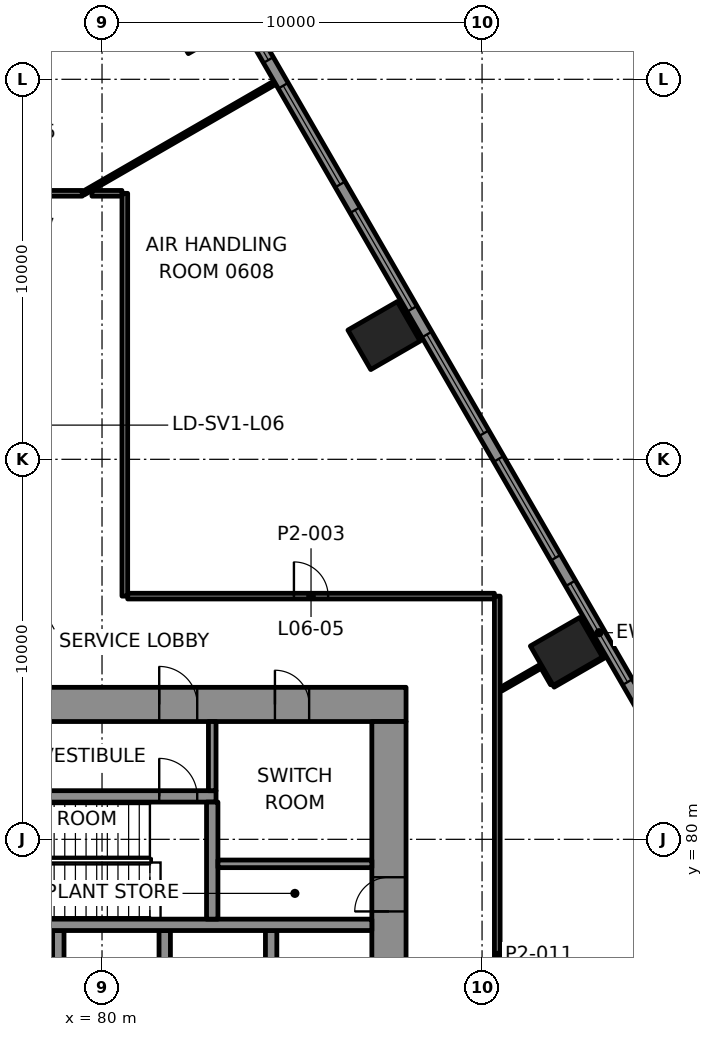
"""IFC4 building model, lengths in metres.
Left out: names, types, materials, properties, quantities, classifications, styles, units other than length and angle.
Written with IfcOpenShell. Run it as: python <this file> out.ifc"""

import sys

from ifc_helpers import new_model, si_unit, direction, frame, frame_2d, origin, origin_2d, place, context, subcontext, project, spatial, rectangle, extrude, element, fill, save


model = new_model("IFC4")
c1 = context("Model", 3, precision=1e-05, world=origin(), true_north=direction((0.0, 1.0)))
c2 = subcontext(c1, "Body", "Model", "MODEL_VIEW")
j1 = project(units=[si_unit("LENGTHUNIT", "METRE"), si_unit("PLANEANGLEUNIT", "RADIAN")], contexts=[c1])
p1 = place(None, origin())
s1 = spatial("IfcSite", under=j1, at=p1, CompositionType="ELEMENT")
p2 = place(p1, origin())
s2 = spatial("IfcBuilding", under=s1, at=p2, CompositionType="ELEMENT")
p3 = place(p2, frame((0.0, 0.0, 31.0)))
s3 = spatial("IfcBuildingStorey", under=s2, at=p3, CompositionType="ELEMENT", Elevation=31.0)
for number, where, z_axis, x_axis in (
    (1, (92.22, 84.942, -0.0), (0.0, 0.0, 1.0), (-0.5, 0.866, 0.0)),
    (2, (87.421, 93.256, -0.0), (0.0, 0.0, 1.0), (-0.5, 0.866, 0.0)),
    (3, (82.621, 101.57, -0.0), (0.0, 0.0, 1.0), (-0.5, 0.866, 0.0)),
):
    element("IfcColumn", number, at=place(p3, frame(where, z_axis=z_axis, x_axis=x_axis)), inside=s3, PredefinedType="COLUMN", context=c2, shape_type="SweptSolid", body=[
        extrude(rectangle(XDim=1.2, YDim=1.5, at=origin_2d()), origin(), (0.0, 0.0, 1.0), 4.5),
    ])
p4 = place(p3, frame((62.0, 83.55, 0.0), z_axis=(0.0, 0.0, 1.0), x_axis=(1.0, 0.0, 0.0)))
e4 = element("IfcWall", 4, at=p4, inside=s3, PredefinedType="SHEAR", context=c2, shape_type="SweptSolid", body=[
    extrude(rectangle(XDim=26.0, YDim=0.9, at=frame_2d((13.0, 0.0))), origin(), (0.0, 0.0, 1.0), 4.05),
])
p5 = place(p4, frame((5.695, 0.0, 0.0)))
e5 = element("IfcOpeningElement", 5, at=p5, cuts=e4, PredefinedType="OPENING", context=c2, shape_type="SweptSolid", body=[
    extrude(rectangle(XDim=1.0, YDim=2.1, at=frame_2d((0.5, 1.05))), frame((0.0, 0.46, 0.0), z_axis=(0.0, -1.0, 0.0), x_axis=(1.0, 0.0, 0.0)), (0.0, 0.0, 1.0), 0.92),
])
p6 = place(p4, frame((19.505, 0.0, 0.0)))
e6 = element("IfcOpeningElement", 6, at=p6, cuts=e4, PredefinedType="OPENING", context=c2, shape_type="SweptSolid", body=[
    extrude(rectangle(XDim=1.0, YDim=2.1, at=frame_2d((0.5, 1.05))), frame((0.0, 0.46, 0.0), z_axis=(0.0, -1.0, 0.0), x_axis=(1.0, 0.0, 0.0)), (0.0, 0.0, 1.0), 0.92),
])
p7 = place(p4, frame((3.45, 0.0, 0.0)))
e7 = element("IfcOpeningElement", 7, at=p7, cuts=e4, PredefinedType="OPENING", context=c2, shape_type="SweptSolid", body=[
    extrude(rectangle(XDim=0.9, YDim=2.1, at=frame_2d((0.45, 1.05))), frame((0.0, 0.46, 0.0), z_axis=(0.0, -1.0, 0.0), x_axis=(1.0, 0.0, 0.0)), (0.0, 0.0, 1.0), 0.92),
])
p8 = place(p4, frame((12.65, 0.0, 0.0)))
e8 = element("IfcOpeningElement", 8, at=p8, cuts=e4, PredefinedType="OPENING", context=c2, shape_type="SweptSolid", body=[
    extrude(rectangle(XDim=0.9, YDim=2.1, at=frame_2d((0.45, 1.05))), frame((0.0, 0.46, 0.0), z_axis=(0.0, -1.0, 0.0), x_axis=(1.0, 0.0, 0.0)), (0.0, 0.0, 1.0), 0.92),
])
p9 = place(p4, frame((22.55, 0.0, 0.0)))
e9 = element("IfcOpeningElement", 9, at=p9, cuts=e4, PredefinedType="OPENING", context=c2, shape_type="SweptSolid", body=[
    extrude(rectangle(XDim=0.9, YDim=2.1, at=frame_2d((0.45, 1.05))), frame((0.0, 0.46, 0.0), z_axis=(0.0, -1.0, 0.0), x_axis=(1.0, 0.0, 0.0)), (0.0, 0.0, 1.0), 0.92),
])
p10 = place(p3, frame((87.55, 66.9, 0.0), z_axis=(0.0, 0.0, 1.0), x_axis=(0.0, 1.0, 0.0)))
e10 = element("IfcWall", 10, at=p10, inside=s3, PredefinedType="SHEAR", context=c2, shape_type="SweptSolid", body=[
    extrude(rectangle(XDim=16.2, YDim=0.9, at=frame_2d((8.1, 0.0))), origin(), (0.0, 0.0, 1.0), 4.05),
])
p11 = place(p10, frame((5.5, 0.0, 0.0)))
e11 = element("IfcOpeningElement", 11, at=p11, cuts=e10, PredefinedType="OPENING", context=c2, shape_type="SweptSolid", body=[
    extrude(rectangle(XDim=1.8, YDim=2.1, at=frame_2d((0.9, 1.05))), frame((0.0, 0.46, 0.0), z_axis=(0.0, -1.0, 0.0), x_axis=(1.0, 0.0, 0.0)), (0.0, 0.0, 1.0), 0.92),
])
p12 = place(p10, frame((11.202, 0.0, 0.0)))
e12 = element("IfcOpeningElement", 12, at=p12, cuts=e10, PredefinedType="OPENING", context=c2, shape_type="SweptSolid", body=[
    extrude(rectangle(XDim=0.9, YDim=2.1, at=frame_2d((0.45, 1.05))), frame((0.0, 0.46, 0.0), z_axis=(0.0, -1.0, 0.0), x_axis=(1.0, 0.0, 0.0)), (0.0, 0.0, 1.0), 0.92),
])
for number, where, z_axis, x_axis in (
    (13, (78.85, 75.0, 0.0), (0.0, 0.0, 1.0), (0.0, 1.0, 0.0)),
    (14, (81.65, 75.0, 0.0), (0.0, 0.0, 1.0), (0.0, 1.0, 0.0)),
    (15, (84.45, 75.0, 0.0), (0.0, 0.0, 1.0), (0.0, 1.0, 0.0)),
):
    element("IfcWall", number, at=place(p3, frame(where, z_axis=z_axis, x_axis=x_axis)), inside=s3, PredefinedType="SHEAR", context=c2, shape_type="SweptSolid", body=[
        extrude(rectangle(XDim=2.6, YDim=0.3, at=frame_2d((1.3, 0.0))), origin(), (0.0, 0.0, 1.0), 4.05),
    ])
p13 = place(p3, frame((64.35, 77.75, 0.0), z_axis=(0.0, 0.0, 1.0), x_axis=(1.0, 0.0, 0.0)))
e16 = element("IfcWall", 16, at=p13, inside=s3, PredefinedType="SHEAR", context=c2, shape_type="SweptSolid", body=[
    extrude(rectangle(XDim=22.75, YDim=0.3, at=frame_2d((11.375, 0.0))), origin(), (0.0, 0.0, 1.0), 4.05),
])
p14 = place(p13, frame((3.345, 0.0, 0.0)))
e17 = element("IfcOpeningElement", 17, at=p14, cuts=e16, PredefinedType="OPENING", context=c2, shape_type="SweptSolid", body=[
    extrude(rectangle(XDim=1.0, YDim=2.1, at=frame_2d((0.5, 1.05))), frame((0.0, 0.16, 0.0), z_axis=(0.0, -1.0, 0.0), x_axis=(1.0, 0.0, 0.0)), (0.0, 0.0, 1.0), 0.32),
])
p15 = place(p3, frame((76.14, 81.13, 0.0), z_axis=(0.0, 0.0, 1.0), x_axis=(1.0, 0.0, 0.0)))
e18 = element("IfcWall", 18, at=p15, inside=s3, PredefinedType="SHEAR", context=c2, shape_type="SweptSolid", body=[
    extrude(rectangle(XDim=6.86, YDim=0.3, at=frame_2d((3.43, 0.0))), origin(), (0.0, 0.0, 1.0), 4.05),
])
p16 = place(p15, frame((5.365, 0.0, 0.0)))
e19 = element("IfcOpeningElement", 19, at=p16, cuts=e18, PredefinedType="OPENING", context=c2, shape_type="SweptSolid", body=[
    extrude(rectangle(XDim=1.0, YDim=2.1, at=frame_2d((0.5, 1.05))), frame((0.0, 0.16, 0.0), z_axis=(0.0, -1.0, 0.0), x_axis=(1.0, 0.0, 0.0)), (0.0, 0.0, 1.0), 0.32),
])
p17 = place(p3, frame((82.9, 77.9, 0.0), z_axis=(0.0, 0.0, 1.0), x_axis=(0.0, 1.0, 0.0)))
e20 = element("IfcWall", 20, at=p17, inside=s3, PredefinedType="SHEAR", context=c2, shape_type="SweptSolid", body=[
    extrude(rectangle(XDim=3.08, YDim=0.3, at=frame_2d((1.54, 0.0))), origin(), (0.0, 0.0, 1.0), 4.05),
])
p18 = place(p3, frame((80.675, 86.4, 0.0), z_axis=(0.0, 0.0, 1.0), x_axis=(1.0, 0.0, 0.0)))
e21 = element("IfcWall", 21, at=p18, inside=s3, PredefinedType="PARTITIONING", context=c2, shape_type="SweptSolid", body=[
    extrude(rectangle(XDim=9.649, YDim=0.15, at=frame_2d((4.825, 0.0))), origin(), (0.0, 0.0, 1.0), 3.45),
])
p19 = place(p18, frame((4.375, 0.0, 0.0)))
e22 = element("IfcOpeningElement", 22, at=p19, cuts=e21, PredefinedType="OPENING", context=c2, shape_type="SweptSolid", body=[
    extrude(rectangle(XDim=0.9, YDim=2.1, at=frame_2d((0.45, 1.05))), frame((0.0, 0.085, 0.0), z_axis=(0.0, -1.0, 0.0), x_axis=(1.0, 0.0, 0.0)), (0.0, 0.0, 1.0), 0.17),
])
p20 = place(p3, frame((76.275, 97.0, 0.0), z_axis=(0.0, 0.0, 1.0), x_axis=(1.0, 0.0, 0.0)))
e23 = element("IfcWall", 23, at=p20, inside=s3, PredefinedType="PARTITIONING", context=c2, shape_type="SweptSolid", body=[
    extrude(rectangle(XDim=3.205, YDim=0.15, at=frame_2d((1.603, 0.0))), origin(), (0.0, 0.0, 1.0), 3.45),
])
p21 = place(p20, frame((1.153, 0.0, 0.0)))
e24 = element("IfcOpeningElement", 24, at=p21, cuts=e23, PredefinedType="OPENING", context=c2, shape_type="SweptSolid", body=[
    extrude(rectangle(XDim=0.9, YDim=2.1, at=frame_2d((0.45, 1.05))), frame((0.0, 0.085, 0.0), z_axis=(0.0, -1.0, 0.0), x_axis=(1.0, 0.0, 0.0)), (0.0, 0.0, 1.0), 0.17),
])
p22 = place(p3, frame((91.871, 84.048, 0.0), z_axis=(0.0, 0.0, 1.0), x_axis=(0.866026058841, 0.499998865407, 0.0)))
e25 = element("IfcWall", 25, at=p22, inside=s3, PredefinedType="PARTITIONING", context=c2, shape_type="SweptSolid", body=[
    extrude(rectangle(XDim=1.708, YDim=0.1, at=frame_2d((0.854, 0.0))), origin(), (0.0, 0.0, 1.0), 3.215),
])
p23 = place(p3, frame((90.501, 83.95, 0.0), z_axis=(0.0, 0.0, 1.0), x_axis=(0.866057204957, 0.499944914708, 0.0)))
e26 = element("IfcWall", 26, at=p23, inside=s3, PredefinedType="PARTITIONING", context=c2, shape_type="SweptSolid", body=[
    extrude(rectangle(XDim=1.235, YDim=0.1, at=frame_2d((0.618, 0.0))), origin(), (0.0, 0.0, 1.0), 3.45),
])
p24 = place(p3, frame((79.505, 97.0, 0.0), z_axis=(0.0, 0.0, 1.0), x_axis=(0.866009767966, 0.500027081053, 0.0)))
e27 = element("IfcWall", 27, at=p24, inside=s3, PredefinedType="PARTITIONING", context=c2, shape_type="SweptSolid", body=[
    extrude(rectangle(XDim=5.943, YDim=0.1, at=frame_2d((2.972, 0.0))), origin(), (0.0, 0.0, 1.0), 3.215),
])
p25 = place(p3, frame((90.4, 86.399, 0.0), z_axis=(0.0, 0.0, 1.0), x_axis=(0.0, -1.0, 0.0)))
e28 = element("IfcWall", 28, at=p25, inside=s3, PredefinedType="PARTITIONING", context=c2, shape_type="SweptSolid", body=[
    extrude(rectangle(XDim=18.905, YDim=0.15, at=frame_2d((9.453, 0.0))), origin(), (0.0, 0.0, 1.0), 3.45),
])
p26 = place(p25, frame((10.005, 0.0, 0.0)))
e29 = element("IfcOpeningElement", 29, at=p26, cuts=e28, PredefinedType="OPENING", context=c2, shape_type="SweptSolid", body=[
    extrude(rectangle(XDim=1.2, YDim=2.1, at=frame_2d((0.6, 1.05))), frame((0.0, 0.085, 0.0), z_axis=(0.0, -1.0, 0.0), x_axis=(1.0, 0.0, 0.0)), (0.0, 0.0, 1.0), 0.17),
])
p27 = place(p3, frame((80.6, 86.4, 0.0), z_axis=(0.0, 0.0, 1.0), x_axis=(0.0, 1.0, 0.0)))
e30 = element("IfcWall", 30, at=p27, inside=s3, PredefinedType="PARTITIONING", context=c2, shape_type="SweptSolid", body=[
    extrude(rectangle(XDim=10.6, YDim=0.15, at=frame_2d((5.3, 0.0))), origin(), (0.0, 0.0, 1.0), 3.45),
])
p28 = place(p3, frame((91.846, 84.092, 0.0), z_axis=(0.0, 0.0, 1.0), x_axis=(-0.500244977835, 0.865883919559, 0.0)))
e31 = element("IfcWall", 31, at=p28, inside=s3, PredefinedType="PARTITIONING", context=c2, shape_type="SweptSolid", body=[
    extrude(rectangle(XDim=0.499, YDim=0.1, at=frame_2d((0.25, 0.0))), origin(), (0.0, 0.0, 1.0), 3.45),
])
p29 = place(p3, frame((79.735, 97.0, 0.0), z_axis=(0.0, 0.0, 1.0), x_axis=(1.0, 0.0, 0.0)))
e32 = element("IfcWall", 32, at=p29, inside=s3, PredefinedType="PARTITIONING", context=c2, shape_type="SweptSolid", body=[
    extrude(rectangle(XDim=0.79, YDim=0.15, at=frame_2d((0.395, 0.0))), origin(), (0.0, 0.0, 1.0), 3.45),
])
p30 = place(p3, frame((107.504, 60.451, 0.0), z_axis=(0.0, 0.0, 1.0), x_axis=(-0.500000550228, 0.86602508611, 0.0)))
e33 = element("IfcWall", 33, at=p30, inside=s3, PredefinedType="SOLIDWALL", context=c2, shape_type="SweptSolid", body=[
    extrude(rectangle(XDim=57.704, YDim=0.3, at=frame_2d((28.852, 0.0))), origin(), (0.0, 0.0, 1.0), 4.05),
])
p31 = place(p30, frame((0.89, 0.0, 0.8)))
e34 = element("IfcOpeningElement", 34, at=p31, cuts=e33, PredefinedType="OPENING", context=c2, shape_type="SweptSolid", body=[
    extrude(rectangle(XDim=3.0, YDim=2.4, at=frame_2d((1.5, 1.2))), frame((0.0, 0.16, 0.0), z_axis=(0.0, -1.0, 0.0), x_axis=(1.0, 0.0, 0.0)), (0.0, 0.0, 1.0), 0.32),
])
p32 = place(p30, frame((4.67, 0.0, 0.8)))
e35 = element("IfcOpeningElement", 35, at=p32, cuts=e33, PredefinedType="OPENING", context=c2, shape_type="SweptSolid", body=[
    extrude(rectangle(XDim=3.0, YDim=2.4, at=frame_2d((1.5, 1.2))), frame((0.0, 0.16, 0.0), z_axis=(0.0, -1.0, 0.0), x_axis=(1.0, 0.0, 0.0)), (0.0, 0.0, 1.0), 0.32),
])
p33 = place(p30, frame((8.451, 0.0, 0.8)))
e36 = element("IfcOpeningElement", 36, at=p33, cuts=e33, PredefinedType="OPENING", context=c2, shape_type="SweptSolid", body=[
    extrude(rectangle(XDim=3.0, YDim=2.4, at=frame_2d((1.5, 1.2))), frame((0.0, 0.16, 0.0), z_axis=(0.0, -1.0, 0.0), x_axis=(1.0, 0.0, 0.0)), (0.0, 0.0, 1.0), 0.32),
])
p34 = place(p30, frame((12.231, 0.0, 0.8)))
e37 = element("IfcOpeningElement", 37, at=p34, cuts=e33, PredefinedType="OPENING", context=c2, shape_type="SweptSolid", body=[
    extrude(rectangle(XDim=3.0, YDim=2.4, at=frame_2d((1.5, 1.2))), frame((0.0, 0.16, 0.0), z_axis=(0.0, -1.0, 0.0), x_axis=(1.0, 0.0, 0.0)), (0.0, 0.0, 1.0), 0.32),
])
p35 = place(p30, frame((16.011, 0.0, 0.8)))
e38 = element("IfcOpeningElement", 38, at=p35, cuts=e33, PredefinedType="OPENING", context=c2, shape_type="SweptSolid", body=[
    extrude(rectangle(XDim=3.0, YDim=2.4, at=frame_2d((1.5, 1.2))), frame((0.0, 0.16, 0.0), z_axis=(0.0, -1.0, 0.0), x_axis=(1.0, 0.0, 0.0)), (0.0, 0.0, 1.0), 0.32),
])
p36 = place(p30, frame((19.792, 0.0, 0.8)))
e39 = element("IfcOpeningElement", 39, at=p36, cuts=e33, PredefinedType="OPENING", context=c2, shape_type="SweptSolid", body=[
    extrude(rectangle(XDim=3.0, YDim=2.4, at=frame_2d((1.5, 1.2))), frame((0.0, 0.16, 0.0), z_axis=(0.0, -1.0, 0.0), x_axis=(1.0, 0.0, 0.0)), (0.0, 0.0, 1.0), 0.32),
])
p37 = place(p30, frame((23.572, 0.0, 0.8)))
e40 = element("IfcOpeningElement", 40, at=p37, cuts=e33, PredefinedType="OPENING", context=c2, shape_type="SweptSolid", body=[
    extrude(rectangle(XDim=3.0, YDim=2.4, at=frame_2d((1.5, 1.2))), frame((0.0, 0.16, 0.0), z_axis=(0.0, -1.0, 0.0), x_axis=(1.0, 0.0, 0.0)), (0.0, 0.0, 1.0), 0.32),
])
p38 = place(p30, frame((27.352, 0.0, 0.8)))
e41 = element("IfcOpeningElement", 41, at=p38, cuts=e33, PredefinedType="OPENING", context=c2, shape_type="SweptSolid", body=[
    extrude(rectangle(XDim=3.0, YDim=2.4, at=frame_2d((1.5, 1.2))), frame((0.0, 0.16, 0.0), z_axis=(0.0, -1.0, 0.0), x_axis=(1.0, 0.0, 0.0)), (0.0, 0.0, 1.0), 0.32),
])
p39 = place(p30, frame((31.132, 0.0, 0.8)))
e42 = element("IfcOpeningElement", 42, at=p39, cuts=e33, PredefinedType="OPENING", context=c2, shape_type="SweptSolid", body=[
    extrude(rectangle(XDim=3.0, YDim=2.4, at=frame_2d((1.5, 1.2))), frame((0.0, 0.16, 0.0), z_axis=(0.0, -1.0, 0.0), x_axis=(1.0, 0.0, 0.0)), (0.0, 0.0, 1.0), 0.32),
])
p40 = place(p30, frame((34.913, 0.0, 0.8)))
e43 = element("IfcOpeningElement", 43, at=p40, cuts=e33, PredefinedType="OPENING", context=c2, shape_type="SweptSolid", body=[
    extrude(rectangle(XDim=3.0, YDim=2.4, at=frame_2d((1.5, 1.2))), frame((0.0, 0.16, 0.0), z_axis=(0.0, -1.0, 0.0), x_axis=(1.0, 0.0, 0.0)), (0.0, 0.0, 1.0), 0.32),
])
p41 = place(p30, frame((38.693, 0.0, 0.8)))
e44 = element("IfcOpeningElement", 44, at=p41, cuts=e33, PredefinedType="OPENING", context=c2, shape_type="SweptSolid", body=[
    extrude(rectangle(XDim=3.0, YDim=2.4, at=frame_2d((1.5, 1.2))), frame((0.0, 0.16, 0.0), z_axis=(0.0, -1.0, 0.0), x_axis=(1.0, 0.0, 0.0)), (0.0, 0.0, 1.0), 0.32),
])
p42 = place(p30, frame((42.473, 0.0, 0.8)))
e45 = element("IfcOpeningElement", 45, at=p42, cuts=e33, PredefinedType="OPENING", context=c2, shape_type="SweptSolid", body=[
    extrude(rectangle(XDim=3.0, YDim=2.4, at=frame_2d((1.5, 1.2))), frame((0.0, 0.16, 0.0), z_axis=(0.0, -1.0, 0.0), x_axis=(1.0, 0.0, 0.0)), (0.0, 0.0, 1.0), 0.32),
])
p43 = place(p30, frame((46.253, 0.0, 0.8)))
e46 = element("IfcOpeningElement", 46, at=p43, cuts=e33, PredefinedType="OPENING", context=c2, shape_type="SweptSolid", body=[
    extrude(rectangle(XDim=3.0, YDim=2.4, at=frame_2d((1.5, 1.2))), frame((0.0, 0.16, 0.0), z_axis=(0.0, -1.0, 0.0), x_axis=(1.0, 0.0, 0.0)), (0.0, 0.0, 1.0), 0.32),
])
p44 = place(p30, frame((50.033, 0.0, 0.8)))
e47 = element("IfcOpeningElement", 47, at=p44, cuts=e33, PredefinedType="OPENING", context=c2, shape_type="SweptSolid", body=[
    extrude(rectangle(XDim=3.0, YDim=2.4, at=frame_2d((1.5, 1.2))), frame((0.0, 0.16, 0.0), z_axis=(0.0, -1.0, 0.0), x_axis=(1.0, 0.0, 0.0)), (0.0, 0.0, 1.0), 0.32),
])
p45 = place(p30, frame((53.814, 0.0, 0.8)))
e48 = element("IfcOpeningElement", 48, at=p45, cuts=e33, PredefinedType="OPENING", context=c2, shape_type="SweptSolid", body=[
    extrude(rectangle(XDim=3.0, YDim=2.4, at=frame_2d((1.5, 1.2))), frame((0.0, 0.16, 0.0), z_axis=(0.0, -1.0, 0.0), x_axis=(1.0, 0.0, 0.0)), (0.0, 0.0, 1.0), 0.32),
])
p46 = place(p3, frame((83.05, 79.355, 0.0), z_axis=(0.0, 0.0, 1.0), x_axis=(1.0, 0.0, 0.0)))
e49 = element("IfcWall", 49, at=p46, inside=s3, PredefinedType="PARTITIONING", context=c2, shape_type="SweptSolid", body=[
    extrude(rectangle(XDim=4.05, YDim=0.2, at=frame_2d((2.025, 0.0))), origin(), (0.0, 0.0, 1.0), 4.05),
])
p47 = place(p3, frame((82.9, 81.28, 0.0), z_axis=(0.0, 0.0, 1.0), x_axis=(0.0, 1.0, 0.0)))
e50 = element("IfcWall", 50, at=p47, inside=s3, PredefinedType="PARTITIONING", context=c2, shape_type="SweptSolid", body=[
    extrude(rectangle(XDim=1.82, YDim=0.2, at=frame_2d((0.91, 0.0))), origin(), (0.0, 0.0, 1.0), 4.05),
])
p48 = place(p19, origin())
e51 = element("IfcDoor", 51, at=p48, inside=s3, OperationType="SINGLE_SWING_LEFT", PredefinedType="DOOR", context=c2, shape_type="SweptSolid", body=[
    extrude(rectangle(XDim=0.9, YDim=2.1, at=frame_2d((0.45, 1.05))), frame((0.0, 0.025, 0.0), z_axis=(0.0, -1.0, 0.0), x_axis=(1.0, 0.0, 0.0)), (0.0, 0.0, 1.0), 0.05),
])
fill(e22, e51)
p49 = place(p38, origin())
e52 = element("IfcWindow", 52, at=p49, inside=s3, PartitioningType="SINGLE_PANEL", PredefinedType="WINDOW", context=c2, shape_type="SweptSolid", body=[
    extrude(rectangle(XDim=3.0, YDim=2.4, at=frame_2d((1.5, 1.2))), frame((0.0, 0.03, 0.0), z_axis=(0.0, -1.0, 0.0), x_axis=(1.0, 0.0, 0.0)), (0.0, 0.0, 1.0), 0.06),
])
fill(e41, e52)
p50 = place(p39, origin())
e53 = element("IfcWindow", 53, at=p50, inside=s3, PartitioningType="SINGLE_PANEL", PredefinedType="WINDOW", context=c2, shape_type="SweptSolid", body=[
    extrude(rectangle(XDim=3.0, YDim=2.4, at=frame_2d((1.5, 1.2))), frame((0.0, 0.03, 0.0), z_axis=(0.0, -1.0, 0.0), x_axis=(1.0, 0.0, 0.0)), (0.0, 0.0, 1.0), 0.06),
])
fill(e42, e53)
p51 = place(p40, origin())
e54 = element("IfcWindow", 54, at=p51, inside=s3, PartitioningType="SINGLE_PANEL", PredefinedType="WINDOW", context=c2, shape_type="SweptSolid", body=[
    extrude(rectangle(XDim=3.0, YDim=2.4, at=frame_2d((1.5, 1.2))), frame((0.0, 0.03, 0.0), z_axis=(0.0, -1.0, 0.0), x_axis=(1.0, 0.0, 0.0)), (0.0, 0.0, 1.0), 0.06),
])
fill(e43, e54)
p52 = place(p41, origin())
e55 = element("IfcWindow", 55, at=p52, inside=s3, PartitioningType="SINGLE_PANEL", PredefinedType="WINDOW", context=c2, shape_type="SweptSolid", body=[
    extrude(rectangle(XDim=3.0, YDim=2.4, at=frame_2d((1.5, 1.2))), frame((0.0, 0.03, 0.0), z_axis=(0.0, -1.0, 0.0), x_axis=(1.0, 0.0, 0.0)), (0.0, 0.0, 1.0), 0.06),
])
fill(e44, e55)
p53 = place(p42, origin())
e56 = element("IfcWindow", 56, at=p53, inside=s3, PartitioningType="SINGLE_PANEL", PredefinedType="WINDOW", context=c2, shape_type="SweptSolid", body=[
    extrude(rectangle(XDim=3.0, YDim=2.4, at=frame_2d((1.5, 1.2))), frame((0.0, 0.03, 0.0), z_axis=(0.0, -1.0, 0.0), x_axis=(1.0, 0.0, 0.0)), (0.0, 0.0, 1.0), 0.06),
])
fill(e45, e56)
p54 = place(p43, origin())
e57 = element("IfcWindow", 57, at=p54, inside=s3, PartitioningType="SINGLE_PANEL", PredefinedType="WINDOW", context=c2, shape_type="SweptSolid", body=[
    extrude(rectangle(XDim=3.0, YDim=2.4, at=frame_2d((1.5, 1.2))), frame((0.0, 0.03, 0.0), z_axis=(0.0, -1.0, 0.0), x_axis=(1.0, 0.0, 0.0)), (0.0, 0.0, 1.0), 0.06),
])
fill(e46, e57)
p55 = place(p16, origin())
e58 = element("IfcDoor", 58, at=p55, inside=s3, OperationType="SINGLE_SWING_RIGHT", PredefinedType="DOOR", context=c2, shape_type="SweptSolid", body=[
    extrude(rectangle(XDim=1.0, YDim=2.1, at=frame_2d((0.5, 1.05))), frame((0.0, 0.025, 0.0), z_axis=(0.0, -1.0, 0.0), x_axis=(1.0, 0.0, 0.0)), (0.0, 0.0, 1.0), 0.05),
])
fill(e19, e58)
p56 = place(p6, origin())
e59 = element("IfcDoor", 59, at=p56, inside=s3, OperationType="SINGLE_SWING_LEFT", PredefinedType="DOOR", context=c2, shape_type="SweptSolid", body=[
    extrude(rectangle(XDim=1.0, YDim=2.1, at=frame_2d((0.5, 1.05))), frame((0.0, 0.17, 0.0), z_axis=(0.0, -1.0, 0.0), x_axis=(1.0, 0.0, 0.0)), (0.0, 0.0, 1.0), 0.34),
])
fill(e6, e59)
p57 = place(p12, origin())
e60 = element("IfcDoor", 60, at=p57, inside=s3, OperationType="SINGLE_SWING_RIGHT", PredefinedType="DOOR", context=c2, shape_type="SweptSolid", body=[
    extrude(rectangle(XDim=0.9, YDim=2.1, at=frame_2d((0.45, 1.05))), frame((0.0, 0.17, 0.0), z_axis=(0.0, -1.0, 0.0), x_axis=(1.0, 0.0, 0.0)), (0.0, 0.0, 1.0), 0.34),
])
fill(e12, e60)
p58 = place(p9, origin())
e61 = element("IfcDoor", 61, at=p58, inside=s3, OperationType="SINGLE_SWING_LEFT", PredefinedType="DOOR", context=c2, shape_type="SweptSolid", body=[
    extrude(rectangle(XDim=0.9, YDim=2.1, at=frame_2d((0.45, 1.05))), frame((0.0, 0.17, 0.0), z_axis=(0.0, -1.0, 0.0), x_axis=(1.0, 0.0, 0.0)), (0.0, 0.0, 1.0), 0.34),
])
fill(e9, e61)
save(model, sys.argv[1])
